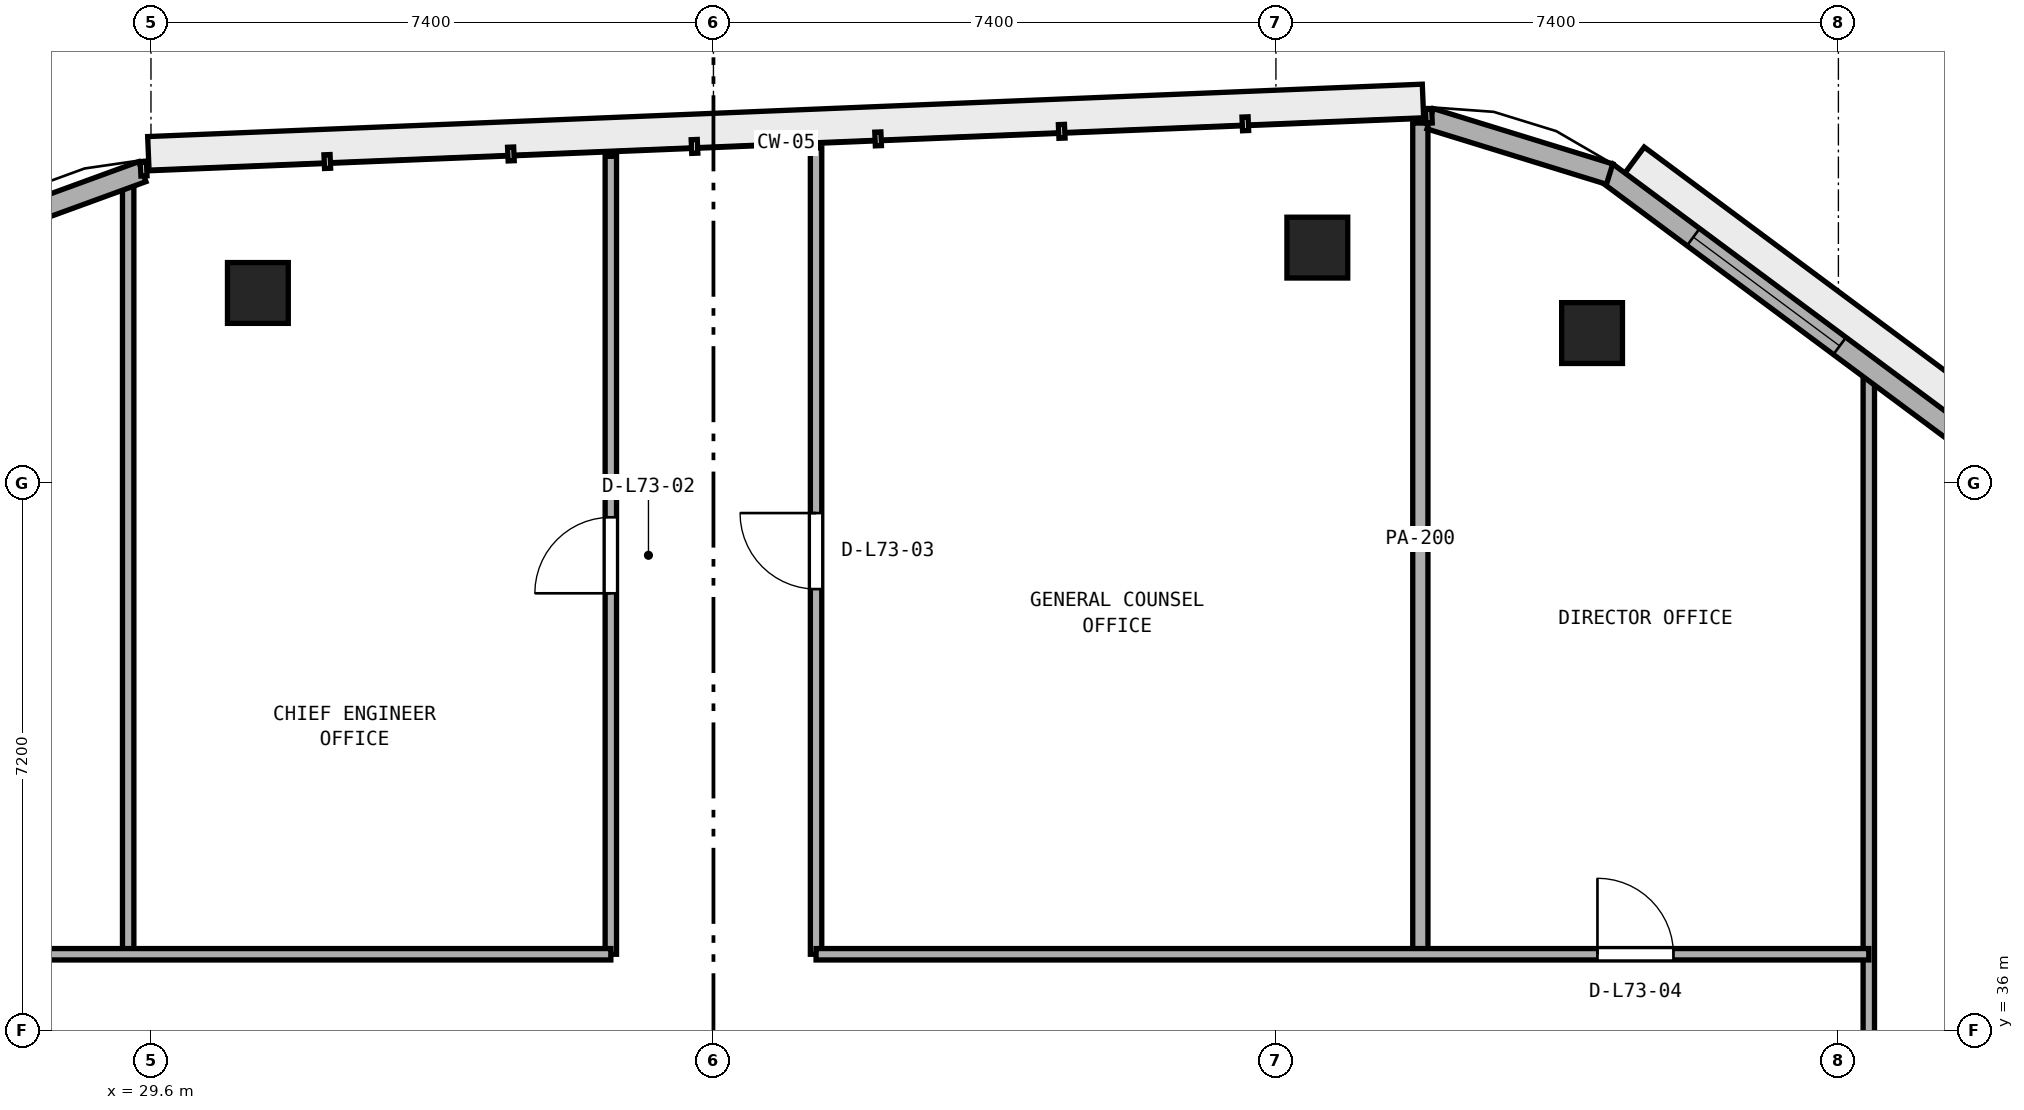
"""IFC4 building model, lengths in metres.
Left out: names, types, materials, properties, quantities, classifications, styles, units other than length and angle.
Written with IfcOpenShell. Run it as: python <this file> out.ifc"""

import sys

from ifc_helpers import new_model, si_unit, direction, frame, frame_2d, origin, origin_2d, place, context, subcontext, project, spatial, rectangle, extrude, element, fill, save


model = new_model("IFC4")
c1 = context("Model", 3, precision=1e-05, world=origin(), true_north=direction((0.0, 1.0)))
c2 = subcontext(c1, "Body", "Model", "MODEL_VIEW")
j1 = project(units=[si_unit("LENGTHUNIT", "METRE"), si_unit("PLANEANGLEUNIT", "RADIAN")], contexts=[c1])
p1 = place(None, origin())
s1 = spatial("IfcSite", under=j1, at=p1, CompositionType="ELEMENT")
p2 = place(p1, origin())
s2 = spatial("IfcBuilding", under=s1, at=p2, CompositionType="ELEMENT")
p3 = place(p2, frame((0.0, 0.0, 285.8)))
s3 = spatial("IfcBuildingStorey", under=s2, at=p3, CompositionType="ELEMENT", Elevation=285.8)
for number, where, z_axis, x_axis in (
    (1, (48.559, 45.173, 0.0), (0.0, 0.0, 1.0), (1.0, 0.0, 0.0)),
    (2, (44.945, 46.297, 0.0), (0.0, 0.0, 1.0), (1.0, 0.0, 0.0)),
    (3, (31.007, 45.7, 0.0), (0.0, 0.0, 1.0), (1.0, 0.0, 0.0)),
):
    element("IfcColumn", number, at=place(p3, frame(where, z_axis=z_axis, x_axis=x_axis)), inside=s3, PredefinedType="COLUMN", context=c2, shape_type="SweptSolid", body=[
        extrude(rectangle(XDim=0.8, YDim=0.8, at=origin_2d()), origin(), (0.0, 0.0, 1.0), 3.8),
    ])
p4 = place(p3, frame((52.2, 22.6, 0.0), z_axis=(0.0, 0.0, 1.0), x_axis=(0.0, 1.0, 0.0)))
e4 = element("IfcWall", 4, at=p4, inside=s3, PredefinedType="PARTITIONING", context=c2, shape_type="SweptSolid", body=[
    extrude(rectangle(XDim=22.153, YDim=0.15, at=frame_2d((11.076, 0.0))), origin(), (0.0, 0.0, 1.0), 3.54),
])
p5 = place(p4, frame((1.87, 0.0, 0.0)))
e5 = element("IfcOpeningElement", 5, at=p5, cuts=e4, PredefinedType="OPENING", context=c2, shape_type="SweptSolid", body=[
    extrude(rectangle(XDim=1.0, YDim=2.12, at=frame_2d((0.5, 1.06))), frame((0.0, 0.085, 0.0), z_axis=(0.0, -1.0, 0.0), x_axis=(1.0, 0.0, 0.0)), (0.0, 0.0, 1.0), 0.17),
])
p6 = place(p4, frame((8.95, 0.0, 0.0)))
e6 = element("IfcOpeningElement", 6, at=p6, cuts=e4, PredefinedType="OPENING", context=c2, shape_type="SweptSolid", body=[
    extrude(rectangle(XDim=1.0, YDim=2.12, at=frame_2d((0.5, 1.06))), frame((0.0, 0.085, 0.0), z_axis=(0.0, -1.0, 0.0), x_axis=(1.0, 0.0, 0.0)), (0.0, 0.0, 1.0), 0.17),
])
p7 = place(p3, frame((46.3, 37.0, 0.0), z_axis=(0.0, 0.0, 1.0), x_axis=(0.0, 1.0, 0.0)))
e7 = element("IfcWall", 7, at=p7, inside=s3, PredefinedType="PARTITIONING", context=c2, shape_type="SweptSolid", body=[
    extrude(rectangle(XDim=10.935, YDim=0.2, at=frame_2d((5.468, 0.0))), origin(), (0.0, 0.0, 1.0), 3.54),
])
p8 = place(p3, frame((38.35, 37.0, 0.0), z_axis=(0.0, 0.0, 1.0), x_axis=(0.0, 1.0, 0.0)))
e8 = element("IfcWall", 8, at=p8, inside=s3, PredefinedType="PARTITIONING", context=c2, shape_type="SweptSolid", body=[
    extrude(rectangle(XDim=10.609, YDim=0.15, at=frame_2d((5.304, 0.0))), origin(), (0.0, 0.0, 1.0), 3.54),
])
p9 = place(p8, frame((4.804, 0.0, 0.0)))
e9 = element("IfcOpeningElement", 9, at=p9, cuts=e8, PredefinedType="OPENING", context=c2, shape_type="SweptSolid", body=[
    extrude(rectangle(XDim=1.0, YDim=2.12, at=frame_2d((0.5, 1.06))), frame((0.0, 0.085, 0.0), z_axis=(0.0, -1.0, 0.0), x_axis=(1.0, 0.0, 0.0)), (0.0, 0.0, 1.0), 0.17),
])
p10 = place(p3, frame((35.65, 37.0, 0.0), z_axis=(0.0, 0.0, 1.0), x_axis=(0.0, 1.0, 0.0)))
e10 = element("IfcWall", 10, at=p10, inside=s3, PredefinedType="PARTITIONING", context=c2, shape_type="SweptSolid", body=[
    extrude(rectangle(XDim=10.498, YDim=0.15, at=frame_2d((5.249, 0.0))), origin(), (0.0, 0.0, 1.0), 3.54),
])
p11 = place(p10, frame((4.749, 0.0, 0.0)))
e11 = element("IfcOpeningElement", 11, at=p11, cuts=e10, PredefinedType="OPENING", context=c2, shape_type="SweptSolid", body=[
    extrude(rectangle(XDim=1.0, YDim=2.12, at=frame_2d((0.5, 1.06))), frame((0.0, 0.085, 0.0), z_axis=(0.0, -1.0, 0.0), x_axis=(1.0, 0.0, 0.0)), (0.0, 0.0, 1.0), 0.17),
])
p12 = place(p3, frame((29.3, 37.0, 0.0), z_axis=(0.0, 0.0, 1.0), x_axis=(0.0, 1.0, 0.0)))
e12 = element("IfcWall", 12, at=p12, inside=s3, PredefinedType="PARTITIONING", context=c2, shape_type="SweptSolid", body=[
    extrude(rectangle(XDim=10.216, YDim=0.15, at=frame_2d((5.108, 0.0))), origin(), (0.0, 0.0, 1.0), 3.54),
])
p13 = place(p3, frame((21.8, 37.0, 0.0), z_axis=(0.0, 0.0, 1.0), x_axis=(1.0, 0.0, 0.0)))
e13 = element("IfcWall", 13, at=p13, inside=s3, PredefinedType="PARTITIONING", context=c2, shape_type="SweptSolid", body=[
    extrude(rectangle(XDim=13.85, YDim=0.15, at=frame_2d((6.925, 0.0))), origin(), (0.0, 0.0, 1.0), 3.54),
])
p14 = place(p13, frame((3.37, 0.0, 0.0)))
e14 = element("IfcOpeningElement", 14, at=p14, cuts=e13, PredefinedType="OPENING", context=c2, shape_type="SweptSolid", body=[
    extrude(rectangle(XDim=1.0, YDim=2.12, at=frame_2d((0.5, 1.06))), frame((0.0, 0.085, 0.0), z_axis=(0.0, -1.0, 0.0), x_axis=(1.0, 0.0, 0.0)), (0.0, 0.0, 1.0), 0.17),
])
p15 = place(p3, frame((38.35, 37.0, 0.0), z_axis=(0.0, 0.0, 1.0), x_axis=(1.0, 0.0, 0.0)))
e15 = element("IfcWall", 15, at=p15, inside=s3, PredefinedType="PARTITIONING", context=c2, shape_type="SweptSolid", body=[
    extrude(rectangle(XDim=13.85, YDim=0.15, at=frame_2d((6.925, 0.0))), origin(), (0.0, 0.0, 1.0), 3.54),
])
p16 = place(p15, frame((10.28, 0.0, 0.0)))
e16 = element("IfcOpeningElement", 16, at=p16, cuts=e15, PredefinedType="OPENING", context=c2, shape_type="SweptSolid", body=[
    extrude(rectangle(XDim=1.0, YDim=2.12, at=frame_2d((0.5, 1.06))), frame((0.0, 0.085, 0.0), z_axis=(0.0, -1.0, 0.0), x_axis=(1.0, 0.0, 0.0)), (0.0, 0.0, 1.0), 0.17),
])
p17 = place(p3, frame((60.984, 38.187, 0.0), z_axis=(0.0, 0.0, 1.0), x_axis=(-0.802485144343, 0.596672098484, 0.0)))
e17 = element("IfcWall", 17, at=p17, inside=s3, PredefinedType="STANDARD", context=c2, shape_type="SweptSolid", body=[
    extrude(rectangle(XDim=15.248, YDim=0.28, at=frame_2d((7.624, 0.0))), origin(), (0.0, 0.0, 1.0), 3.54),
])
p18 = place(p17, frame((1.675, 0.0, 0.9)))
e18 = element("IfcOpeningElement", 18, at=p18, cuts=e17, PredefinedType="OPENING", context=c2, shape_type="SweptSolid", body=[
    extrude(rectangle(XDim=2.4, YDim=1.75, at=frame_2d((1.2, 0.875))), frame((0.0, 0.15, 0.0), z_axis=(0.0, -1.0, 0.0), x_axis=(1.0, 0.0, 0.0)), (0.0, 0.0, 1.0), 0.3),
])
p19 = place(p17, frame((6.424, 0.0, 0.9)))
e19 = element("IfcOpeningElement", 19, at=p19, cuts=e17, PredefinedType="OPENING", context=c2, shape_type="SweptSolid", body=[
    extrude(rectangle(XDim=2.4, YDim=1.75, at=frame_2d((1.2, 0.875))), frame((0.0, 0.15, 0.0), z_axis=(0.0, -1.0, 0.0), x_axis=(1.0, 0.0, 0.0)), (0.0, 0.0, 1.0), 0.3),
])
p20 = place(p17, frame((11.423, 0.0, 0.9)))
e20 = element("IfcOpeningElement", 20, at=p20, cuts=e17, PredefinedType="OPENING", context=c2, shape_type="SweptSolid", body=[
    extrude(rectangle(XDim=2.4, YDim=1.75, at=frame_2d((1.2, 0.875))), frame((0.0, 0.15, 0.0), z_axis=(0.0, -1.0, 0.0), x_axis=(1.0, 0.0, 0.0)), (0.0, 0.0, 1.0), 0.3),
])
p21 = place(p3, frame((48.79, 47.264, 0.0), z_axis=(0.0, 0.0, 1.0), x_axis=(-0.955575823363, 0.294745391489, 0.0)))
e21 = element("IfcWall", 21, at=p21, inside=s3, PredefinedType="STANDARD", context=c2, shape_type="SweptSolid", body=[
    extrude(rectangle(XDim=2.471, YDim=0.28, at=frame_2d((1.235, 0.0))), origin(), (0.0, 0.0, 1.0), 3.54),
])
p22 = place(p3, frame((29.486, 47.296, 0.0), z_axis=(0.0, 0.0, 1.0), x_axis=(-0.939434048497, -0.342729731019, 0.0)))
e22 = element("IfcWall", 22, at=p22, inside=s3, PredefinedType="STANDARD", context=c2, shape_type="SweptSolid", body=[
    extrude(rectangle(XDim=2.245, YDim=0.28, at=frame_2d((1.122, 0.0))), origin(), (0.0, 0.0, 1.0), 3.54),
])
p23 = place(p11, origin())
e23 = element("IfcDoor", 23, at=p23, inside=s3, OperationType="SINGLE_SWING_LEFT", PredefinedType="DOOR", context=c2, shape_type="SweptSolid", body=[
    extrude(rectangle(XDim=1.0, YDim=2.12, at=frame_2d((0.5, 1.06))), frame((0.0, 0.025, 0.0), z_axis=(0.0, -1.0, 0.0), x_axis=(1.0, 0.0, 0.0)), (0.0, 0.0, 1.0), 0.05),
])
fill(e11, e23)
p24 = place(p9, origin())
e24 = element("IfcDoor", 24, at=p24, inside=s3, OperationType="SINGLE_SWING_RIGHT", PredefinedType="DOOR", context=c2, shape_type="SweptSolid", body=[
    extrude(rectangle(XDim=1.0, YDim=2.12, at=frame_2d((0.5, 1.06))), frame((0.0, 0.025, 0.0), z_axis=(0.0, -1.0, 0.0), x_axis=(1.0, 0.0, 0.0)), (0.0, 0.0, 1.0), 0.05),
])
fill(e9, e24)
p25 = place(p16, origin())
e25 = element("IfcDoor", 25, at=p25, inside=s3, OperationType="SINGLE_SWING_LEFT", PredefinedType="DOOR", context=c2, shape_type="SweptSolid", body=[
    extrude(rectangle(XDim=1.0, YDim=2.12, at=frame_2d((0.5, 1.06))), frame((0.0, 0.025, 0.0), z_axis=(0.0, -1.0, 0.0), x_axis=(1.0, 0.0, 0.0)), (0.0, 0.0, 1.0), 0.05),
])
fill(e16, e25)
p26 = place(p20, origin())
e26 = element("IfcWindow", 26, at=p26, inside=s3, PartitioningType="SINGLE_PANEL", PredefinedType="WINDOW", context=c2, shape_type="SweptSolid", body=[
    extrude(rectangle(XDim=2.4, YDim=1.75, at=frame_2d((1.2, 0.875))), frame((0.0, 0.03, 0.0), z_axis=(0.0, -1.0, 0.0), x_axis=(1.0, 0.0, 0.0)), (0.0, 0.0, 1.0), 0.06),
])
fill(e20, e26)
save(model, sys.argv[1])
